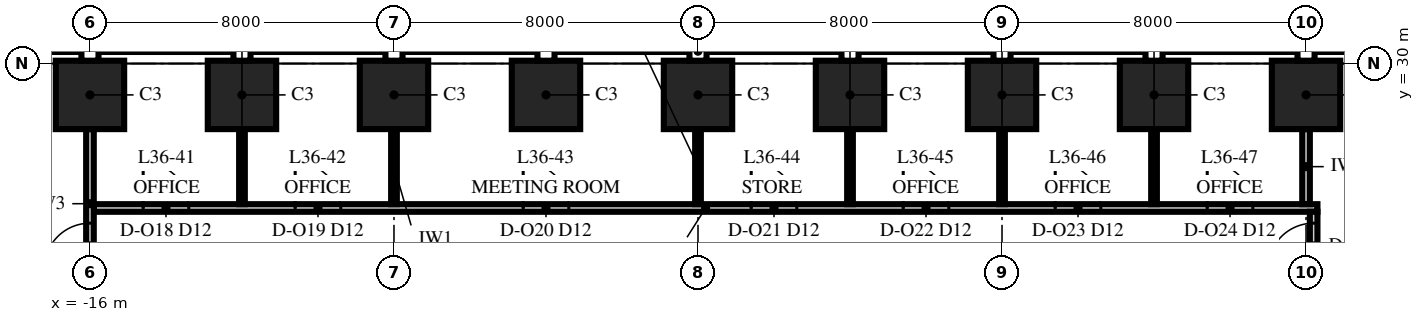
"""IFC4 building model, lengths in metres.
Left out: names, types, materials, properties, quantities, classifications, styles, units other than length and angle.
Written with IfcOpenShell. Run it as: python <this file> out.ifc"""

import sys

from ifc_helpers import new_model, si_unit, direction, frame, frame_2d, origin, origin_2d, place, context, subcontext, project, spatial, rectangle, extrude, element, fill, save


model = new_model("IFC4")
c1 = context("Model", 3, precision=1e-05, world=origin(), true_north=direction((0.0, 1.0)))
c2 = subcontext(c1, "Body", "Model", "MODEL_VIEW")
j1 = project(units=[si_unit("LENGTHUNIT", "METRE"), si_unit("PLANEANGLEUNIT", "RADIAN")], contexts=[c1])
p1 = place(None, origin())
s1 = spatial("IfcSite", under=j1, at=p1, CompositionType="ELEMENT")
p2 = place(p1, origin())
s2 = spatial("IfcBuilding", under=s1, at=p2, CompositionType="ELEMENT")
p3 = place(p2, frame((0.0, 0.0, 159.0)))
s3 = spatial("IfcBuildingStorey", under=s2, at=p3, CompositionType="ELEMENT", Elevation=159.0)
for number, where, z_axis, x_axis in (
    (1, (16.0, 29.175, 0.0), (0.0, 0.0, 1.0), (-1.0, 0.0, 0.0)),
    (2, (12.0, 29.175, 0.0), (0.0, 0.0, 1.0), (-1.0, 0.0, 0.0)),
    (3, (8.0, 29.175, 0.0), (0.0, 0.0, 1.0), (-1.0, 0.0, 0.0)),
    (4, (4.0, 29.175, 0.0), (0.0, 0.0, 1.0), (-1.0, 0.0, 0.0)),
    (5, (0.0, 29.175, 0.0), (0.0, 0.0, 1.0), (-1.0, 0.0, 0.0)),
    (6, (-4.0, 29.175, 0.0), (0.0, 0.0, 1.0), (-1.0, 0.0, 0.0)),
    (7, (-8.0, 29.175, 0.0), (0.0, 0.0, 1.0), (-1.0, 0.0, 0.0)),
    (8, (-12.0, 29.175, 0.0), (0.0, 0.0, 1.0), (-1.0, 0.0, 0.0)),
    (9, (-16.0, 29.175, 0.0), (0.0, 0.0, 1.0), (-1.0, 0.0, 0.0)),
):
    element("IfcColumn", number, at=place(p3, frame(where, z_axis=z_axis, x_axis=x_axis)), inside=s3, PredefinedType="COLUMN", context=c2, shape_type="SweptSolid", body=[
        extrude(rectangle(XDim=1.8, YDim=1.8, at=origin_2d()), origin(), (0.0, 0.0, 1.0), 4.0),
    ])
p4 = place(p3, frame((-15.9, 26.2, 0.0), z_axis=(0.0, 0.0, 1.0), x_axis=(1.0, 0.0, 0.0)))
e10 = element("IfcWall", 10, at=p4, inside=s3, PredefinedType="PARTITIONING", context=c2, shape_type="SweptSolid", body=[
    extrude(rectangle(XDim=32.2, YDim=0.2, at=frame_2d((16.1, 0.0))), origin(), (0.0, 0.0, 1.0), 3.4),
])
p5 = place(p4, frame((1.3, 0.0, 0.0)))
e11 = element("IfcOpeningElement", 11, at=p5, cuts=e10, PredefinedType="OPENING", context=c2, shape_type="SweptSolid", body=[
    extrude(rectangle(XDim=1.2, YDim=2.4, at=frame_2d((0.6, 1.2))), frame((0.0, 0.115, 0.0), z_axis=(0.0, -1.0, 0.0), x_axis=(1.0, 0.0, 0.0)), (0.0, 0.0, 1.0), 0.23),
])
p6 = place(p4, frame((5.3, 0.0, 0.0)))
e12 = element("IfcOpeningElement", 12, at=p6, cuts=e10, PredefinedType="OPENING", context=c2, shape_type="SweptSolid", body=[
    extrude(rectangle(XDim=1.2, YDim=2.4, at=frame_2d((0.6, 1.2))), frame((0.0, 0.115, 0.0), z_axis=(0.0, -1.0, 0.0), x_axis=(1.0, 0.0, 0.0)), (0.0, 0.0, 1.0), 0.23),
])
p7 = place(p4, frame((11.3, 0.0, 0.0)))
e13 = element("IfcOpeningElement", 13, at=p7, cuts=e10, PredefinedType="OPENING", context=c2, shape_type="SweptSolid", body=[
    extrude(rectangle(XDim=1.2, YDim=2.4, at=frame_2d((0.6, 1.2))), frame((0.0, 0.115, 0.0), z_axis=(0.0, -1.0, 0.0), x_axis=(1.0, 0.0, 0.0)), (0.0, 0.0, 1.0), 0.23),
])
p8 = place(p4, frame((17.3, 0.0, 0.0)))
e14 = element("IfcOpeningElement", 14, at=p8, cuts=e10, PredefinedType="OPENING", context=c2, shape_type="SweptSolid", body=[
    extrude(rectangle(XDim=1.2, YDim=2.4, at=frame_2d((0.6, 1.2))), frame((0.0, 0.115, 0.0), z_axis=(0.0, -1.0, 0.0), x_axis=(1.0, 0.0, 0.0)), (0.0, 0.0, 1.0), 0.23),
])
p9 = place(p4, frame((21.3, 0.0, 0.0)))
e15 = element("IfcOpeningElement", 15, at=p9, cuts=e10, PredefinedType="OPENING", context=c2, shape_type="SweptSolid", body=[
    extrude(rectangle(XDim=1.2, YDim=2.4, at=frame_2d((0.6, 1.2))), frame((0.0, 0.115, 0.0), z_axis=(0.0, -1.0, 0.0), x_axis=(1.0, 0.0, 0.0)), (0.0, 0.0, 1.0), 0.23),
])
p10 = place(p4, frame((25.3, 0.0, 0.0)))
e16 = element("IfcOpeningElement", 16, at=p10, cuts=e10, PredefinedType="OPENING", context=c2, shape_type="SweptSolid", body=[
    extrude(rectangle(XDim=1.2, YDim=2.4, at=frame_2d((0.6, 1.2))), frame((0.0, 0.115, 0.0), z_axis=(0.0, -1.0, 0.0), x_axis=(1.0, 0.0, 0.0)), (0.0, 0.0, 1.0), 0.23),
])
p11 = place(p4, frame((29.3, 0.0, 0.0)))
e17 = element("IfcOpeningElement", 17, at=p11, cuts=e10, PredefinedType="OPENING", context=c2, shape_type="SweptSolid", body=[
    extrude(rectangle(XDim=1.2, YDim=2.4, at=frame_2d((0.6, 1.2))), frame((0.0, 0.115, 0.0), z_axis=(0.0, -1.0, 0.0), x_axis=(1.0, 0.0, 0.0)), (0.0, 0.0, 1.0), 0.23),
])
p12 = place(p3, frame((-16.0, 24.35, 0.0), z_axis=(0.0, 0.0, 1.0), x_axis=(0.0, 1.0, 0.0)))
e18 = element("IfcWall", 18, at=p12, inside=s3, PredefinedType="PARTITIONING", context=c2, shape_type="SweptSolid", body=[
    extrude(rectangle(XDim=3.925, YDim=0.2, at=frame_2d((1.962, 0.0))), origin(), (0.0, 0.0, 1.0), 3.4),
])
p13 = place(p12, frame((0.25, 0.0, 0.0)))
e19 = element("IfcOpeningElement", 19, at=p13, cuts=e18, PredefinedType="OPENING", context=c2, shape_type="SweptSolid", body=[
    extrude(rectangle(XDim=1.2, YDim=2.4, at=frame_2d((0.6, 1.2))), frame((0.0, 0.115, 0.0), z_axis=(0.0, -1.0, 0.0), x_axis=(1.0, 0.0, 0.0)), (0.0, 0.0, 1.0), 0.23),
])
for number, where, z_axis, x_axis in (
    (20, (-12.0, 26.3, 0.0), (0.0, 0.0, 1.0), (0.0, 1.0, 0.0)),
    (21, (-8.0, 26.3, 0.0), (0.0, 0.0, 1.0), (0.0, 1.0, 0.0)),
    (22, (0.0, 26.3, 0.0), (0.0, 0.0, 1.0), (0.0, 1.0, 0.0)),
):
    element("IfcWall", number, at=place(p3, frame(where, z_axis=z_axis, x_axis=x_axis)), inside=s3, PredefinedType="PARTITIONING", context=c2, shape_type="SweptSolid", body=[
        extrude(rectangle(XDim=1.975, YDim=0.15, at=frame_2d((0.987, 0.0))), origin(), (0.0, 0.0, 1.0), 3.4),
    ])
p14 = place(p3, frame((4.0, 26.3, 0.0), z_axis=(0.0, 0.0, 1.0), x_axis=(0.0, 1.0, 0.0)))
e23 = element("IfcWall", 23, at=p14, inside=s3, PredefinedType="PARTITIONING", context=c2, shape_type="SweptSolid", body=[
    extrude(rectangle(XDim=1.975, YDim=0.15, at=frame_2d((0.987, 0.0))), origin(), (0.0, 0.0, 1.0), 3.85),
])
for number, where, z_axis, x_axis in (
    (24, (8.0, 26.3, 0.0), (0.0, 0.0, 1.0), (0.0, 1.0, 0.0)),
    (25, (12.0, 26.3, 0.0), (0.0, 0.0, 1.0), (0.0, 1.0, 0.0)),
):
    element("IfcWall", number, at=place(p3, frame(where, z_axis=z_axis, x_axis=x_axis)), inside=s3, PredefinedType="PARTITIONING", context=c2, shape_type="SweptSolid", body=[
        extrude(rectangle(XDim=1.975, YDim=0.15, at=frame_2d((0.987, 0.0))), origin(), (0.0, 0.0, 1.0), 3.4),
    ])
p15 = place(p3, frame((16.0, 26.3, 0.0), z_axis=(0.0, 0.0, 1.0), x_axis=(0.0, 1.0, 0.0)))
e26 = element("IfcWall", 26, at=p15, inside=s3, PredefinedType="PARTITIONING", context=c2, shape_type="SweptSolid", body=[
    extrude(rectangle(XDim=1.975, YDim=0.2, at=frame_2d((0.987, 0.0))), origin(), (0.0, 0.0, 1.0), 3.4),
])
p16 = place(p3, frame((16.2, 9.9, 0.0), z_axis=(0.0, 0.0, 1.0), x_axis=(0.0, 1.0, 0.0)))
e27 = element("IfcWall", 27, at=p16, inside=s3, PredefinedType="PARTITIONING", context=c2, shape_type="SweptSolid", body=[
    extrude(rectangle(XDim=16.2, YDim=0.2, at=frame_2d((8.1, 0.0))), origin(), (0.0, 0.0, 1.0), 3.25),
])
p17 = place(p16, frame((14.7, 0.0, 0.0)))
e28 = element("IfcOpeningElement", 28, at=p17, cuts=e27, PredefinedType="OPENING", context=c2, shape_type="SweptSolid", body=[
    extrude(rectangle(XDim=1.2, YDim=2.4, at=frame_2d((0.6, 1.2))), frame((0.0, 0.115, 0.0), z_axis=(0.0, -1.0, 0.0), x_axis=(1.0, 0.0, 0.0)), (0.0, 0.0, 1.0), 0.23),
])
p18 = place(p5, origin())
e29 = element("IfcDoor", 29, at=p18, inside=s3, OperationType="SINGLE_SWING_LEFT", PredefinedType="DOOR", context=c2, shape_type="SweptSolid", body=[
    extrude(rectangle(XDim=1.2, YDim=2.4, at=frame_2d((0.6, 1.2))), frame((0.0, 0.1, 0.0), z_axis=(0.0, -1.0, 0.0), x_axis=(1.0, 0.0, 0.0)), (0.0, 0.0, 1.0), 0.199),
])
fill(e11, e29)
p19 = place(p6, origin())
e30 = element("IfcDoor", 30, at=p19, inside=s3, OperationType="SINGLE_SWING_LEFT", PredefinedType="DOOR", context=c2, shape_type="SweptSolid", body=[
    extrude(rectangle(XDim=1.2, YDim=2.4, at=frame_2d((0.6, 1.2))), frame((0.0, 0.1, 0.0), z_axis=(0.0, -1.0, 0.0), x_axis=(1.0, 0.0, 0.0)), (0.0, 0.0, 1.0), 0.199),
])
fill(e12, e30)
p20 = place(p7, origin())
e31 = element("IfcDoor", 31, at=p20, inside=s3, OperationType="SINGLE_SWING_LEFT", PredefinedType="DOOR", context=c2, shape_type="SweptSolid", body=[
    extrude(rectangle(XDim=1.2, YDim=2.4, at=frame_2d((0.6, 1.2))), frame((0.0, 0.1, 0.0), z_axis=(0.0, -1.0, 0.0), x_axis=(1.0, 0.0, 0.0)), (0.0, 0.0, 1.0), 0.199),
])
fill(e13, e31)
p21 = place(p8, origin())
e32 = element("IfcDoor", 32, at=p21, inside=s3, OperationType="SINGLE_SWING_LEFT", PredefinedType="DOOR", context=c2, shape_type="SweptSolid", body=[
    extrude(rectangle(XDim=1.2, YDim=2.4, at=frame_2d((0.6, 1.2))), frame((0.0, 0.1, 0.0), z_axis=(0.0, -1.0, 0.0), x_axis=(1.0, 0.0, 0.0)), (0.0, 0.0, 1.0), 0.199),
])
fill(e14, e32)
p22 = place(p9, origin())
e33 = element("IfcDoor", 33, at=p22, inside=s3, OperationType="SINGLE_SWING_LEFT", PredefinedType="DOOR", context=c2, shape_type="SweptSolid", body=[
    extrude(rectangle(XDim=1.2, YDim=2.4, at=frame_2d((0.6, 1.2))), frame((0.0, 0.1, 0.0), z_axis=(0.0, -1.0, 0.0), x_axis=(1.0, 0.0, 0.0)), (0.0, 0.0, 1.0), 0.199),
])
fill(e15, e33)
p23 = place(p10, origin())
e34 = element("IfcDoor", 34, at=p23, inside=s3, OperationType="SINGLE_SWING_LEFT", PredefinedType="DOOR", context=c2, shape_type="SweptSolid", body=[
    extrude(rectangle(XDim=1.2, YDim=2.4, at=frame_2d((0.6, 1.2))), frame((0.0, 0.1, 0.0), z_axis=(0.0, -1.0, 0.0), x_axis=(1.0, 0.0, 0.0)), (0.0, 0.0, 1.0), 0.199),
])
fill(e16, e34)
p24 = place(p11, origin())
e35 = element("IfcDoor", 35, at=p24, inside=s3, OperationType="SINGLE_SWING_LEFT", PredefinedType="DOOR", context=c2, shape_type="SweptSolid", body=[
    extrude(rectangle(XDim=1.2, YDim=2.4, at=frame_2d((0.6, 1.2))), frame((0.0, 0.1, 0.0), z_axis=(0.0, -1.0, 0.0), x_axis=(1.0, 0.0, 0.0)), (0.0, 0.0, 1.0), 0.199),
])
fill(e17, e35)
p25 = place(p13, origin())
e36 = element("IfcDoor", 36, at=p25, inside=s3, OperationType="SINGLE_SWING_LEFT", PredefinedType="DOOR", context=c2, shape_type="SweptSolid", body=[
    extrude(rectangle(XDim=1.2, YDim=2.4, at=frame_2d((0.6, 1.2))), frame((0.0, 0.1, 0.0), z_axis=(0.0, -1.0, 0.0), x_axis=(1.0, 0.0, 0.0)), (0.0, 0.0, 1.0), 0.199),
])
fill(e19, e36)
p26 = place(p17, origin())
e37 = element("IfcDoor", 37, at=p26, inside=s3, OperationType="SINGLE_SWING_LEFT", PredefinedType="DOOR", context=c2, shape_type="SweptSolid", body=[
    extrude(rectangle(XDim=1.2, YDim=2.4, at=frame_2d((0.6, 1.2))), frame((0.0, 0.1, 0.0), z_axis=(0.0, -1.0, 0.0), x_axis=(1.0, 0.0, 0.0)), (0.0, 0.0, 1.0), 0.199),
])
fill(e28, e37)
save(model, sys.argv[1])
